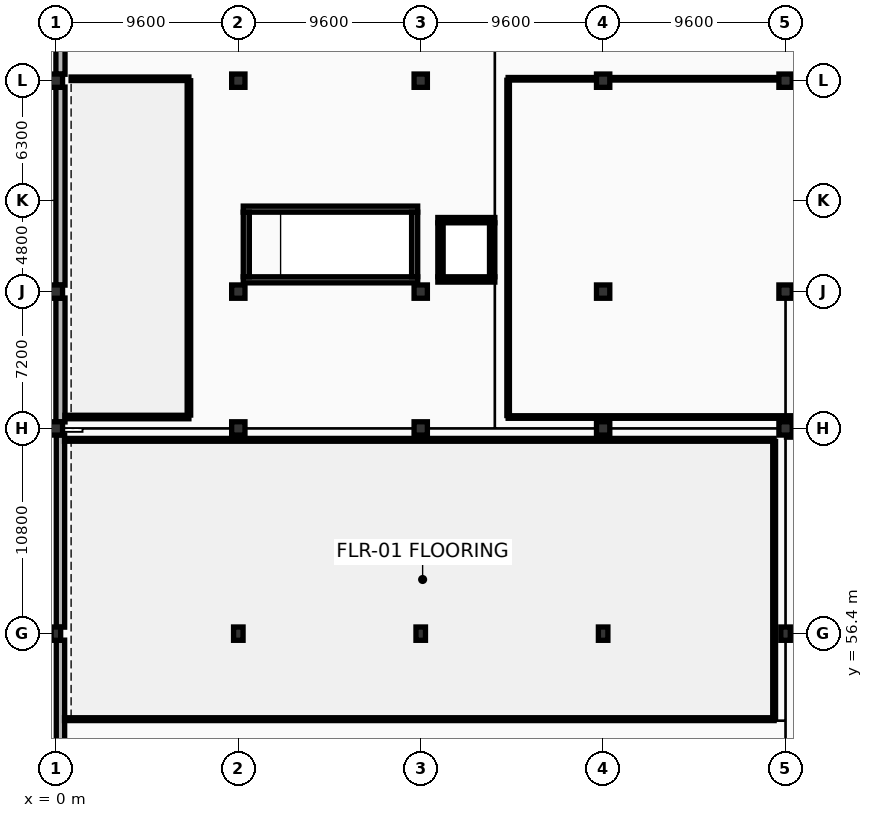
"""IFC4 building model, lengths in metres.
Left out: names, types, materials, properties, quantities, classifications, styles, units other than length and angle.
Written with IfcOpenShell. Run it as: python <this file> out.ifc"""

import sys

from ifc_helpers import new_model, si_unit, direction, frame, frame_2d, origin, origin_2d, place, context, subcontext, project, spatial, rectangle, extrude, element, fill, save


model = new_model("IFC4")
c1 = context("Model", 3, precision=1e-05, world=origin(), true_north=direction((0.0, 1.0)))
c2 = subcontext(c1, "Body", "Model", "MODEL_VIEW")
j1 = project(units=[si_unit("LENGTHUNIT", "METRE"), si_unit("PLANEANGLEUNIT", "RADIAN")], contexts=[c1])
p1 = place(None, origin())
s1 = spatial("IfcSite", under=j1, at=p1, CompositionType="ELEMENT")
p2 = place(p1, origin())
s2 = spatial("IfcBuilding", under=s1, at=p2, CompositionType="ELEMENT")
p3 = place(p2, frame((0.0, 0.0, 5.4)))
s3 = spatial("IfcBuildingStorey", under=s2, at=p3, CompositionType="ELEMENT", Elevation=5.4)
for number, where, z_axis, x_axis in (
    (1, (0.0, 67.2, 0.0), (0.0, 0.0, 1.0), (1.0, 0.0, 0.0)),
    (2, (0.0, 74.4, 0.0), (0.0, 0.0, 1.0), (1.0, 0.0, 0.0)),
    (3, (0.0, 85.5, 0.0), (0.0, 0.0, 1.0), (1.0, 0.0, 0.0)),
    (4, (9.6, 67.2, 0.0), (0.0, 0.0, 1.0), (1.0, 0.0, 0.0)),
    (5, (9.6, 74.4, 0.0), (0.0, 0.0, 1.0), (1.0, 0.0, 0.0)),
    (6, (9.6, 85.5, 0.0), (0.0, 0.0, 1.0), (1.0, 0.0, 0.0)),
    (7, (19.2, 67.2, 0.0), (0.0, 0.0, 1.0), (1.0, 0.0, 0.0)),
    (8, (19.2, 74.4, 0.0), (0.0, 0.0, 1.0), (1.0, 0.0, 0.0)),
    (9, (19.2, 85.5, 0.0), (0.0, 0.0, 1.0), (1.0, 0.0, 0.0)),
    (10, (28.8, 67.2, 0.0), (0.0, 0.0, 1.0), (1.0, 0.0, 0.0)),
    (11, (28.8, 74.4, 0.0), (0.0, 0.0, 1.0), (1.0, 0.0, 0.0)),
    (12, (28.8, 85.5, 0.0), (0.0, 0.0, 1.0), (1.0, 0.0, 0.0)),
    (13, (38.4, 67.2, 0.0), (0.0, 0.0, 1.0), (1.0, 0.0, 0.0)),
    (14, (38.4, 74.4, 0.0), (0.0, 0.0, 1.0), (1.0, 0.0, 0.0)),
    (15, (38.4, 85.5, 0.0), (0.0, 0.0, 1.0), (1.0, 0.0, 0.0)),
):
    element("IfcColumn", number, at=place(p3, frame(where, z_axis=z_axis, x_axis=x_axis)), inside=s3, PredefinedType="COLUMN", context=c2, shape_type="SweptSolid", body=[
        extrude(rectangle(XDim=0.7, YDim=0.7, at=origin_2d()), origin(), (0.0, 0.0, 1.0), 4.5),
    ])
for number, where, z_axis, x_axis in (
    (16, (0.0, 56.4, 0.0), (0.0, 0.0, 1.0), (1.0, 0.0, 0.0)),
    (17, (9.6, 56.4, 0.0), (0.0, 0.0, 1.0), (1.0, 0.0, 0.0)),
    (18, (19.2, 56.4, 0.0), (0.0, 0.0, 1.0), (1.0, 0.0, 0.0)),
    (19, (28.8, 56.4, 0.0), (0.0, 0.0, 1.0), (1.0, 0.0, 0.0)),
    (20, (38.4, 56.4, 0.0), (0.0, 0.0, 1.0), (1.0, 0.0, 0.0)),
):
    element("IfcColumn", number, at=place(p3, frame(where, z_axis=z_axis, x_axis=x_axis)), inside=s3, PredefinedType="COLUMN", context=c2, shape_type="SweptSolid", body=[
        extrude(rectangle(XDim=0.5, YDim=0.7, at=origin_2d()), origin(), (0.0, 0.0, 1.0), 4.5),
    ])
p4 = place(p3, frame((0.24, 67.542, 0.0), z_axis=(0.0, 0.0, 1.0), x_axis=(0.0, 1.0, 0.0)))
e21 = element("IfcWall", 21, at=p4, inside=s3, PredefinedType="STANDARD", context=c2, shape_type="SweptSolid", body=[
    extrude(rectangle(XDim=6.521, YDim=0.48, at=frame_2d((3.26, 0.0))), origin(), (0.0, 0.0, 1.0), 3.38),
])
p5 = place(p4, frame((1.303, 0.0, 0.85)))
e22 = element("IfcOpeningElement", 22, at=p5, cuts=e21, PredefinedType="OPENING", context=c2, shape_type="SweptSolid", body=[
    extrude(rectangle(XDim=1.7, YDim=2.3, at=frame_2d((0.85, 1.15))), frame((0.0, 0.25, 0.0), z_axis=(0.0, -1.0, 0.0), x_axis=(1.0, 0.0, 0.0)), (0.0, 0.0, 1.0), 0.5),
])
p6 = place(p4, frame((3.753, 0.0, 0.85)))
e23 = element("IfcOpeningElement", 23, at=p6, cuts=e21, PredefinedType="OPENING", context=c2, shape_type="SweptSolid", body=[
    extrude(rectangle(XDim=1.7, YDim=2.3, at=frame_2d((0.85, 1.15))), frame((0.0, 0.25, 0.0), z_axis=(0.0, -1.0, 0.0), x_axis=(1.0, 0.0, 0.0)), (0.0, 0.0, 1.0), 0.5),
])
p7 = place(p3, frame((0.24, 74.742, 0.0), z_axis=(0.0, 0.0, 1.0), x_axis=(0.0, 1.0, 0.0)))
e24 = element("IfcWall", 24, at=p7, inside=s3, PredefinedType="STANDARD", context=c2, shape_type="SweptSolid", body=[
    extrude(rectangle(XDim=10.421, YDim=0.48, at=frame_2d((5.21, 0.0))), origin(), (0.0, 0.0, 1.0), 3.33),
])
p8 = place(p7, frame((1.345, 0.0, 0.85)))
e25 = element("IfcOpeningElement", 25, at=p8, cuts=e24, PredefinedType="OPENING", context=c2, shape_type="SweptSolid", body=[
    extrude(rectangle(XDim=1.7, YDim=2.3, at=frame_2d((0.85, 1.15))), frame((0.0, 0.25, 0.0), z_axis=(0.0, -1.0, 0.0), x_axis=(1.0, 0.0, 0.0)), (0.0, 0.0, 1.0), 0.5),
])
p9 = place(p7, frame((4.358, 0.0, 0.85)))
e26 = element("IfcOpeningElement", 26, at=p9, cuts=e24, PredefinedType="OPENING", context=c2, shape_type="SweptSolid", body=[
    extrude(rectangle(XDim=1.7, YDim=2.3, at=frame_2d((0.85, 1.15))), frame((0.0, 0.25, 0.0), z_axis=(0.0, -1.0, 0.0), x_axis=(1.0, 0.0, 0.0)), (0.0, 0.0, 1.0), 0.5),
])
p10 = place(p7, frame((7.371, 0.0, 0.85)))
e27 = element("IfcOpeningElement", 27, at=p10, cuts=e24, PredefinedType="OPENING", context=c2, shape_type="SweptSolid", body=[
    extrude(rectangle(XDim=1.7, YDim=2.3, at=frame_2d((0.85, 1.15))), frame((0.0, 0.25, 0.0), z_axis=(0.0, -1.0, 0.0), x_axis=(1.0, 0.0, 0.0)), (0.0, 0.0, 1.0), 0.5),
])
p11 = place(p3, frame((0.24, 85.837, 0.0), z_axis=(0.0, 0.0, 1.0), x_axis=(0.0, 1.0, 0.0)))
e28 = element("IfcWall", 28, at=p11, inside=s3, PredefinedType="STANDARD", context=c2, shape_type="SweptSolid", body=[
    extrude(rectangle(XDim=11.921, YDim=0.48, at=frame_2d((5.96, 0.0))), origin(), (0.0, 0.0, 1.0), 3.28),
])
p12 = place(p11, frame((5.113, 0.0, 0.76)))
e29 = element("IfcOpeningElement", 29, at=p12, cuts=e28, PredefinedType="OPENING", context=c2, shape_type="SweptSolid", body=[
    extrude(rectangle(XDim=1.7, YDim=2.3, at=frame_2d((0.85, 1.15))), frame((0.0, 0.25, 0.0), z_axis=(0.0, -1.0, 0.0), x_axis=(1.0, 0.0, 0.0)), (0.0, 0.0, 1.0), 0.5),
])
p13 = place(p11, frame((8.626, 0.0, 0.76)))
e30 = element("IfcOpeningElement", 30, at=p13, cuts=e28, PredefinedType="OPENING", context=c2, shape_type="SweptSolid", body=[
    extrude(rectangle(XDim=1.7, YDim=2.3, at=frame_2d((0.85, 1.15))), frame((0.0, 0.25, 0.0), z_axis=(0.0, -1.0, 0.0), x_axis=(1.0, 0.0, 0.0)), (0.0, 0.0, 1.0), 0.5),
])
p14 = place(p3, frame((0.24, 47.142, 0.0), z_axis=(0.0, 0.0, 1.0), x_axis=(0.0, 1.0, 0.0)))
e31 = element("IfcWall", 31, at=p14, inside=s3, PredefinedType="STANDARD", context=c2, shape_type="SweptSolid", body=[
    extrude(rectangle(XDim=8.916, YDim=0.44, at=frame_2d((4.458, 0.0))), origin(), (0.0, 0.0, 1.0), 3.38),
])
p15 = place(p14, frame((6.308, 0.0, 0.9)))
e32 = element("IfcOpeningElement", 32, at=p15, cuts=e31, PredefinedType="OPENING", context=c2, shape_type="SweptSolid", body=[
    extrude(rectangle(XDim=1.3, YDim=2.1, at=frame_2d((0.65, 1.05))), frame((0.0, 0.23, 0.0), z_axis=(0.0, -1.0, 0.0), x_axis=(1.0, 0.0, 0.0)), (0.0, 0.0, 1.0), 0.46),
])
p16 = place(p3, frame((0.24, 56.742, 0.0), z_axis=(0.0, 0.0, 1.0), x_axis=(0.0, 1.0, 0.0)))
e33 = element("IfcWall", 33, at=p16, inside=s3, PredefinedType="STANDARD", context=c2, shape_type="SweptSolid", body=[
    extrude(rectangle(XDim=10.116, YDim=0.44, at=frame_2d((5.058, 0.0))), origin(), (0.0, 0.0, 1.0), 3.38),
])
p17 = place(p16, frame((1.508, 0.0, 0.9)))
e34 = element("IfcOpeningElement", 34, at=p17, cuts=e33, PredefinedType="OPENING", context=c2, shape_type="SweptSolid", body=[
    extrude(rectangle(XDim=1.3, YDim=2.1, at=frame_2d((0.65, 1.05))), frame((0.0, 0.23, 0.0), z_axis=(0.0, -1.0, 0.0), x_axis=(1.0, 0.0, 0.0)), (0.0, 0.0, 1.0), 0.46),
])
p18 = place(p16, frame((4.408, 0.0, 0.9)))
e35 = element("IfcOpeningElement", 35, at=p18, cuts=e33, PredefinedType="OPENING", context=c2, shape_type="SweptSolid", body=[
    extrude(rectangle(XDim=1.3, YDim=2.1, at=frame_2d((0.65, 1.05))), frame((0.0, 0.23, 0.0), z_axis=(0.0, -1.0, 0.0), x_axis=(1.0, 0.0, 0.0)), (0.0, 0.0, 1.0), 0.46),
])
p19 = place(p16, frame((7.308, 0.0, 0.9)))
e36 = element("IfcOpeningElement", 36, at=p19, cuts=e33, PredefinedType="OPENING", context=c2, shape_type="SweptSolid", body=[
    extrude(rectangle(XDim=1.3, YDim=2.1, at=frame_2d((0.65, 1.05))), frame((0.0, 0.23, 0.0), z_axis=(0.0, -1.0, 0.0), x_axis=(1.0, 0.0, 0.0)), (0.0, 0.0, 1.0), 0.46),
])
p20 = place(p3, frame((38.45, 66.96, 0.0), z_axis=(0.0, 0.0, 1.0), x_axis=(1.0, 0.0, 0.0)))
e37 = element("IfcWall", 37, at=p20, inside=s3, PredefinedType="STANDARD", context=c2, shape_type="SweptSolid", body=[
    extrude(rectangle(XDim=7.55, YDim=0.44, at=frame_2d((3.775, 0.0))), origin(), (0.0, 0.0, 1.0), 3.23),
])
for number, where, z_axis, x_axis in (
    (38, (9.86, 78.74, 0.0), (0.0, 0.0, 1.0), (1.0, 0.0, 0.0)),
    (39, (19.04, 75.02, 0.0), (0.0, 0.0, 1.0), (-1.0, 0.0, 0.0)),
):
    element("IfcWall", number, at=place(p3, frame(where, z_axis=z_axis, x_axis=x_axis)), inside=s3, PredefinedType="SHEAR", context=c2, shape_type="SweptSolid", body=[
        extrude(rectangle(XDim=9.18, YDim=0.32, at=frame_2d((4.59, 0.0))), origin(), (0.0, 0.0, 1.0), 4.24),
    ])
p21 = place(p3, frame((10.02, 75.18, 0.0), z_axis=(0.0, 0.0, 1.0), x_axis=(0.0, 1.0, 0.0)))
e40 = element("IfcWall", 40, at=p21, inside=s3, PredefinedType="SHEAR", context=c2, shape_type="SweptSolid", body=[
    extrude(rectangle(XDim=3.4, YDim=0.32, at=frame_2d((1.7, 0.0))), origin(), (0.0, 0.0, 1.0), 4.24),
])
p22 = place(p21, frame((1.125, 0.0, 0.0)))
e41 = element("IfcOpeningElement", 41, at=p22, cuts=e40, PredefinedType="OPENING", context=c2, shape_type="SweptSolid", body=[
    extrude(rectangle(XDim=1.15, YDim=2.2, at=frame_2d((0.575, 1.1))), frame((0.0, 0.17, 0.0), z_axis=(0.0, -1.0, 0.0), x_axis=(1.0, 0.0, 0.0)), (0.0, 0.0, 1.0), 0.34),
])
p23 = place(p3, frame((18.88, 78.58, 0.0), z_axis=(0.0, 0.0, 1.0), x_axis=(0.0, -1.0, 0.0)))
e42 = element("IfcWall", 42, at=p23, inside=s3, PredefinedType="SHEAR", context=c2, shape_type="SweptSolid", body=[
    extrude(rectangle(XDim=3.4, YDim=0.32, at=frame_2d((1.7, 0.0))), origin(), (0.0, 0.0, 1.0), 4.24),
])
p24 = place(p3, frame((20.1, 78.16, 0.0), z_axis=(0.0, 0.0, 1.0), x_axis=(1.0, 0.0, 0.0)))
e43 = element("IfcWall", 43, at=p24, inside=s3, PredefinedType="SHEAR", context=c2, shape_type="SweptSolid", body=[
    extrude(rectangle(XDim=3.0, YDim=0.28, at=frame_2d((1.5, 0.0))), origin(), (0.0, 0.0, 1.0), 4.24),
])
p25 = place(p24, frame((0.975, 0.0, 0.0)))
e44 = element("IfcOpeningElement", 44, at=p25, cuts=e43, PredefinedType="OPENING", context=c2, shape_type="SweptSolid", body=[
    extrude(rectangle(XDim=1.05, YDim=2.2, at=frame_2d((0.525, 1.1))), frame((0.0, 0.15, 0.0), z_axis=(0.0, -1.0, 0.0), x_axis=(1.0, 0.0, 0.0)), (0.0, 0.0, 1.0), 0.3),
])
p26 = place(p3, frame((23.1, 75.04, 0.0), z_axis=(0.0, 0.0, 1.0), x_axis=(-1.0, 0.0, 0.0)))
e45 = element("IfcWall", 45, at=p26, inside=s3, PredefinedType="SHEAR", context=c2, shape_type="SweptSolid", body=[
    extrude(rectangle(XDim=3.0, YDim=0.28, at=frame_2d((1.5, 0.0))), origin(), (0.0, 0.0, 1.0), 4.24),
])
for number, where, z_axis, x_axis in (
    (46, (20.24, 75.18, 0.0), (0.0, 0.0, 1.0), (0.0, 1.0, 0.0)),
    (47, (22.96, 78.02, 0.0), (0.0, 0.0, 1.0), (0.0, -1.0, 0.0)),
):
    element("IfcWall", number, at=place(p3, frame(where, z_axis=z_axis, x_axis=x_axis)), inside=s3, PredefinedType="SHEAR", context=c2, shape_type="SweptSolid", body=[
        extrude(rectangle(XDim=2.84, YDim=0.28, at=frame_2d((1.42, 0.0))), origin(), (0.0, 0.0, 1.0), 4.24),
    ])
p27 = place(p3, frame((0.8, 85.6, 0.0), z_axis=(0.0, 0.0, 1.0), x_axis=(1.0, 0.0, 0.0)))
e48 = element("IfcWall", 48, at=p27, inside=s3, PredefinedType="PARTITIONING", context=c2, shape_type="SweptSolid", body=[
    extrude(rectangle(XDim=6.2, YDim=0.185, at=frame_2d((3.1, 0.0))), origin(), (0.0, 0.0, 1.0), 3.43),
])
p28 = place(p27, frame((2.1, 0.0, 0.0)))
e49 = element("IfcOpeningElement", 49, at=p28, cuts=e48, PredefinedType="OPENING", context=c2, shape_type="SweptSolid", body=[
    extrude(rectangle(XDim=2.0, YDim=2.5, at=frame_2d((1.0, 1.25))), frame((0.0, 0.103, 0.0), z_axis=(0.0, -1.0, 0.0), x_axis=(1.0, 0.0, 0.0)), (0.0, 0.0, 1.0), 0.205),
])
p29 = place(p3, frame((7.0, 67.8, 0.0), z_axis=(0.0, 0.0, 1.0), x_axis=(-1.0, 0.0, 0.0)))
e50 = element("IfcWall", 50, at=p29, inside=s3, PredefinedType="PARTITIONING", context=c2, shape_type="SweptSolid", body=[
    extrude(rectangle(XDim=6.526, YDim=0.185, at=frame_2d((3.263, 0.0))), origin(), (0.0, 0.0, 1.0), 4.225),
])
p30 = place(p3, frame((7.0, 85.498, 0.0), z_axis=(0.0, 0.0, 1.0), x_axis=(0.0, -1.0, 0.0)))
e51 = element("IfcWall", 51, at=p30, inside=s3, PredefinedType="PARTITIONING", context=c2, shape_type="SweptSolid", body=[
    extrude(rectangle(XDim=17.595, YDim=0.185, at=frame_2d((8.797, 0.0))), origin(), (0.0, 0.0, 1.0), 3.43),
])
p31 = place(p3, frame((23.8, 85.6, 0.0), z_axis=(0.0, 0.0, 1.0), x_axis=(1.0, 0.0, 0.0)))
e52 = element("IfcWall", 52, at=p31, inside=s3, PredefinedType="PARTITIONING", context=c2, shape_type="SweptSolid", body=[
    extrude(rectangle(XDim=21.8, YDim=0.135, at=frame_2d((10.9, 0.0))), origin(), (0.0, 0.0, 1.0), 3.33),
])
p32 = place(p31, frame((8.382, 0.0, 0.0)))
e53 = element("IfcOpeningElement", 53, at=p32, cuts=e52, PredefinedType="OPENING", context=c2, shape_type="SweptSolid", body=[
    extrude(rectangle(XDim=1.02, YDim=2.15, at=frame_2d((0.51, 1.075))), frame((0.0, 0.077, 0.0), z_axis=(0.0, -1.0, 0.0), x_axis=(1.0, 0.0, 0.0)), (0.0, 0.0, 1.0), 0.155),
])
p33 = place(p3, frame((45.6, 67.8, 0.0), z_axis=(0.0, 0.0, 1.0), x_axis=(-1.0, 0.0, 0.0)))
e54 = element("IfcWall", 54, at=p33, inside=s3, PredefinedType="PARTITIONING", context=c2, shape_type="SweptSolid", body=[
    extrude(rectangle(XDim=21.8, YDim=0.135, at=frame_2d((10.9, 0.0))), origin(), (0.0, 0.0, 1.0), 3.68),
])
p34 = place(p3, frame((23.8, 67.877, 0.0), z_axis=(0.0, 0.0, 1.0), x_axis=(0.0, 1.0, 0.0)))
e55 = element("IfcWall", 55, at=p34, inside=s3, PredefinedType="PARTITIONING", context=c2, shape_type="SweptSolid", body=[
    extrude(rectangle(XDim=17.645, YDim=0.135, at=frame_2d((8.823, 0.0))), origin(), (0.0, 0.0, 1.0), 3.43),
])
p35 = place(p3, frame((0.454, 66.6, 0.0), z_axis=(0.0, 0.0, 1.0), x_axis=(1.0, 0.0, 0.0)))
e56 = element("IfcWall", 56, at=p35, inside=s3, PredefinedType="PARTITIONING", context=c2, shape_type="SweptSolid", body=[
    extrude(rectangle(XDim=37.346, YDim=0.15, at=frame_2d((18.673, 0.0))), origin(), (0.0, 0.0, 1.0), 3.38),
])
p36 = place(p3, frame((37.8, 51.9, 0.0), z_axis=(0.0, 0.0, 1.0), x_axis=(-1.0, 0.0, 0.0)))
e57 = element("IfcWall", 57, at=p36, inside=s3, PredefinedType="PARTITIONING", context=c2, shape_type="SweptSolid", body=[
    extrude(rectangle(XDim=37.346, YDim=0.15, at=frame_2d((18.673, 0.0))), origin(), (0.0, 0.0, 1.0), 3.23),
])
p37 = place(p36, frame((2.107, 0.0, 0.0)))
e58 = element("IfcOpeningElement", 58, at=p37, cuts=e57, PredefinedType="OPENING", context=c2, shape_type="SweptSolid", body=[
    extrude(rectangle(XDim=1.5, YDim=2.35, at=frame_2d((0.75, 1.175))), frame((0.0, 0.085, 0.0), z_axis=(0.0, -1.0, 0.0), x_axis=(1.0, 0.0, 0.0)), (0.0, 0.0, 1.0), 0.17),
])
p38 = place(p3, frame((37.8, 66.515, 0.0), z_axis=(0.0, 0.0, 1.0), x_axis=(0.0, -1.0, 0.0)))
e59 = element("IfcWall", 59, at=p38, inside=s3, PredefinedType="PARTITIONING", context=c2, shape_type="SweptSolid", body=[
    extrude(rectangle(XDim=14.53, YDim=0.15, at=frame_2d((7.265, 0.0))), origin(), (0.0, 0.0, 1.0), 3.43),
])
p39 = place(p5, origin())
e60 = element("IfcWindow", 60, at=p39, inside=s3, PartitioningType="SINGLE_PANEL", PredefinedType="WINDOW", context=c2, shape_type="SweptSolid", body=[
    extrude(rectangle(XDim=1.7, YDim=2.3, at=frame_2d((0.85, 1.15))), frame((0.0, 0.03, 0.0), z_axis=(0.0, -1.0, 0.0), x_axis=(1.0, 0.0, 0.0)), (0.0, 0.0, 1.0), 0.06),
])
fill(e22, e60)
p40 = place(p6, origin())
e61 = element("IfcWindow", 61, at=p40, inside=s3, PartitioningType="SINGLE_PANEL", PredefinedType="WINDOW", context=c2, shape_type="SweptSolid", body=[
    extrude(rectangle(XDim=1.7, YDim=2.3, at=frame_2d((0.85, 1.15))), frame((0.0, 0.03, 0.0), z_axis=(0.0, -1.0, 0.0), x_axis=(1.0, 0.0, 0.0)), (0.0, 0.0, 1.0), 0.06),
])
fill(e23, e61)
p41 = place(p8, origin())
e62 = element("IfcWindow", 62, at=p41, inside=s3, PartitioningType="SINGLE_PANEL", PredefinedType="WINDOW", context=c2, shape_type="SweptSolid", body=[
    extrude(rectangle(XDim=1.7, YDim=2.3, at=frame_2d((0.85, 1.15))), frame((0.0, 0.03, 0.0), z_axis=(0.0, -1.0, 0.0), x_axis=(1.0, 0.0, 0.0)), (0.0, 0.0, 1.0), 0.06),
])
fill(e25, e62)
p42 = place(p9, origin())
e63 = element("IfcWindow", 63, at=p42, inside=s3, PartitioningType="SINGLE_PANEL", PredefinedType="WINDOW", context=c2, shape_type="SweptSolid", body=[
    extrude(rectangle(XDim=1.7, YDim=2.3, at=frame_2d((0.85, 1.15))), frame((0.0, 0.03, 0.0), z_axis=(0.0, -1.0, 0.0), x_axis=(1.0, 0.0, 0.0)), (0.0, 0.0, 1.0), 0.06),
])
fill(e26, e63)
p43 = place(p10, origin())
e64 = element("IfcWindow", 64, at=p43, inside=s3, PartitioningType="SINGLE_PANEL", PredefinedType="WINDOW", context=c2, shape_type="SweptSolid", body=[
    extrude(rectangle(XDim=1.7, YDim=2.3, at=frame_2d((0.85, 1.15))), frame((0.0, 0.03, 0.0), z_axis=(0.0, -1.0, 0.0), x_axis=(1.0, 0.0, 0.0)), (0.0, 0.0, 1.0), 0.06),
])
fill(e27, e64)
p44 = place(p15, origin())
e65 = element("IfcWindow", 65, at=p44, inside=s3, PartitioningType="SINGLE_PANEL", PredefinedType="WINDOW", context=c2, shape_type="SweptSolid", body=[
    extrude(rectangle(XDim=1.3, YDim=2.1, at=frame_2d((0.65, 1.05))), frame((0.0, 0.03, 0.0), z_axis=(0.0, -1.0, 0.0), x_axis=(1.0, 0.0, 0.0)), (0.0, 0.0, 1.0), 0.06),
])
fill(e32, e65)
p45 = place(p17, origin())
e66 = element("IfcWindow", 66, at=p45, inside=s3, PartitioningType="SINGLE_PANEL", PredefinedType="WINDOW", context=c2, shape_type="SweptSolid", body=[
    extrude(rectangle(XDim=1.3, YDim=2.1, at=frame_2d((0.65, 1.05))), frame((0.0, 0.03, 0.0), z_axis=(0.0, -1.0, 0.0), x_axis=(1.0, 0.0, 0.0)), (0.0, 0.0, 1.0), 0.06),
])
fill(e34, e66)
p46 = place(p18, origin())
e67 = element("IfcWindow", 67, at=p46, inside=s3, PartitioningType="SINGLE_PANEL", PredefinedType="WINDOW", context=c2, shape_type="SweptSolid", body=[
    extrude(rectangle(XDim=1.3, YDim=2.1, at=frame_2d((0.65, 1.05))), frame((0.0, 0.03, 0.0), z_axis=(0.0, -1.0, 0.0), x_axis=(1.0, 0.0, 0.0)), (0.0, 0.0, 1.0), 0.06),
])
fill(e35, e67)
p47 = place(p19, origin())
e68 = element("IfcWindow", 68, at=p47, inside=s3, PartitioningType="SINGLE_PANEL", PredefinedType="WINDOW", context=c2, shape_type="SweptSolid", body=[
    extrude(rectangle(XDim=1.3, YDim=2.1, at=frame_2d((0.65, 1.05))), frame((0.0, 0.03, 0.0), z_axis=(0.0, -1.0, 0.0), x_axis=(1.0, 0.0, 0.0)), (0.0, 0.0, 1.0), 0.06),
])
fill(e36, e68)
p48 = place(p22, origin())
e69 = element("IfcDoor", 69, at=p48, inside=s3, OperationType="SINGLE_SWING_RIGHT", PredefinedType="DOOR", context=c2, shape_type="SweptSolid", body=[
    extrude(rectangle(XDim=1.15, YDim=2.2, at=frame_2d((0.575, 1.1))), frame((0.0, 0.025, 0.0), z_axis=(0.0, -1.0, 0.0), x_axis=(1.0, 0.0, 0.0)), (0.0, 0.0, 1.0), 0.05),
])
fill(e41, e69)
p49 = place(p25, origin())
e70 = element("IfcDoor", 70, at=p49, inside=s3, OperationType="DOUBLE_DOOR_SLIDING", PredefinedType="DOOR", context=c2, shape_type="SweptSolid", body=[
    extrude(rectangle(XDim=1.05, YDim=2.2, at=frame_2d((0.525, 1.1))), frame((0.0, 0.025, 0.0), z_axis=(0.0, -1.0, 0.0), x_axis=(1.0, 0.0, 0.0)), (0.0, 0.0, 1.0), 0.05),
])
fill(e44, e70)
p50 = place(p28, origin())
e71 = element("IfcDoor", 71, at=p50, inside=s3, OperationType="DOUBLE_DOOR_SINGLE_SWING", PredefinedType="DOOR", context=c2, shape_type="SweptSolid", body=[
    extrude(rectangle(XDim=2.0, YDim=2.5, at=frame_2d((1.0, 1.25))), frame((0.0, 0.025, 0.0), z_axis=(0.0, -1.0, 0.0), x_axis=(1.0, 0.0, 0.0)), (0.0, 0.0, 1.0), 0.05),
])
fill(e49, e71)
p51 = place(p32, origin())
e72 = element("IfcDoor", 72, at=p51, inside=s3, OperationType="SINGLE_SWING_LEFT", PredefinedType="DOOR", context=c2, shape_type="SweptSolid", body=[
    extrude(rectangle(XDim=1.02, YDim=2.15, at=frame_2d((0.51, 1.075))), frame((0.0, 0.025, 0.0), z_axis=(0.0, -1.0, 0.0), x_axis=(1.0, 0.0, 0.0)), (0.0, 0.0, 1.0), 0.05),
])
fill(e53, e72)
p52 = place(p37, origin())
e73 = element("IfcDoor", 73, at=p52, inside=s3, OperationType="DOUBLE_DOOR_SINGLE_SWING", PredefinedType="DOOR", context=c2, shape_type="SweptSolid", body=[
    extrude(rectangle(XDim=1.5, YDim=2.35, at=frame_2d((0.75, 1.175))), frame((0.0, 0.025, 0.0), z_axis=(0.0, -1.0, 0.0), x_axis=(1.0, 0.0, 0.0)), (0.0, 0.0, 1.0), 0.05),
])
fill(e58, e73)
save(model, sys.argv[1])
